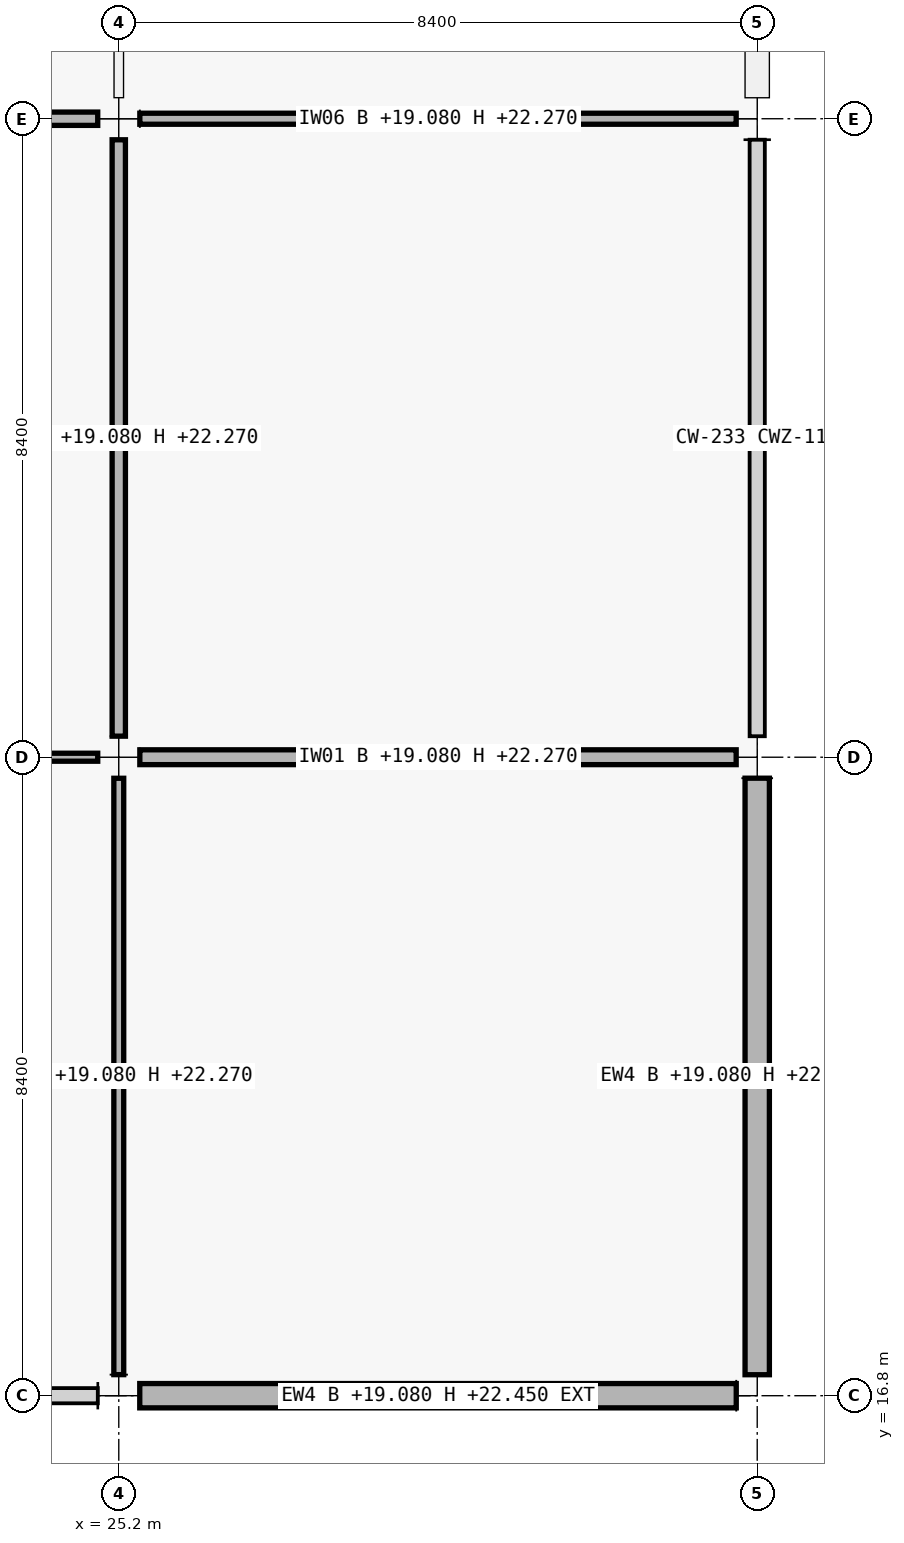
"""IFC4 building model, lengths in metres.
Left out: names, types, materials, properties, quantities, classifications, styles, units other than length and angle.
Written with IfcOpenShell. Run it as: python <this file> out.ifc"""

import sys

from ifc_helpers import new_model, si_unit, direction, frame, frame_2d, origin, origin_2d, place, context, subcontext, project, spatial, rectangle, i_section, extrude, element, fill, save


model = new_model("IFC4")
c1 = context("Model", 3, precision=1e-05, world=origin(), true_north=direction((0.0, 1.0)))
c2 = subcontext(c1, "Body", "Model", "MODEL_VIEW")
j1 = project(units=[si_unit("LENGTHUNIT", "METRE"), si_unit("PLANEANGLEUNIT", "RADIAN")], contexts=[c1])
p1 = place(None, origin())
s1 = spatial("IfcSite", under=j1, at=p1, CompositionType="ELEMENT")
p2 = place(p1, origin())
s2 = spatial("IfcBuilding", under=s1, at=p2, CompositionType="ELEMENT")
p3 = place(p2, frame((0.0, 0.0, 19.08)))
s3 = spatial("IfcBuildingStorey", under=s2, at=p3, CompositionType="ELEMENT", Elevation=19.08)
for number, where, z_axis, x_axis in (
    (1, (25.2, 16.8, 0.0), (0.0, 0.0, 1.0), (1.0, 0.0, 0.0)),
    (2, (25.2, 25.2, 0.0), (0.0, 0.0, 1.0), (1.0, 0.0, 0.0)),
    (3, (25.2, 33.6, 0.0), (0.0, 0.0, 1.0), (1.0, 0.0, 0.0)),
    (4, (33.6, 16.8, 0.0), (0.0, 0.0, 1.0), (1.0, 0.0, 0.0)),
    (5, (33.6, 25.2, 0.0), (0.0, 0.0, 1.0), (1.0, 0.0, 0.0)),
    (6, (33.6, 33.6, 0.0), (0.0, 0.0, 1.0), (1.0, 0.0, 0.0)),
):
    element("IfcColumn", number, at=place(p3, frame(where, z_axis=z_axis, x_axis=x_axis)), inside=s3, PredefinedType="COLUMN", context=c2, shape_type="SweptSolid", body=[
        extrude(rectangle(XDim=0.55, YDim=0.55, at=origin_2d()), origin(), (0.0, 0.0, 1.0), 4.16),
    ])
for number, where, z_axis, x_axis in (
    (7, (25.2, 16.8, 4.16), (0.0, 0.0, 1.0), (1.0, 0.0, 0.0)),
    (8, (25.2, 25.2, 4.16), (0.0, 0.0, 1.0), (1.0, 0.0, 0.0)),
    (9, (25.2, 33.6, 4.16), (0.0, 0.0, 1.0), (1.0, 0.0, 0.0)),
):
    element("IfcColumn", number, at=place(p3, frame(where, z_axis=z_axis, x_axis=x_axis)), inside=s3, PredefinedType="COLUMN", context=c2, shape_type="SweptSolid", body=[
        extrude(i_section(OverallWidth=0.305, OverallDepth=0.308, WebThickness=0.01, FlangeThickness=0.015, FilletRadius=0.017, at=origin_2d()), origin(), (0.0, 0.0, 1.0), 1.925),
    ])
p4 = place(p3, frame((33.324, 16.8, 0.0), z_axis=(0.0, 0.0, 1.0), x_axis=(-1.0, 0.0, 0.0)))
e10 = element("IfcWall", 10, at=p4, inside=s3, PredefinedType="SOLIDWALL", context=c2, shape_type="SweptSolid", body=[
    extrude(rectangle(XDim=7.848, YDim=0.32, at=frame_2d((3.924, 0.0))), origin(), (0.0, 0.0, 1.0), 3.37),
])
p5 = place(p3, frame((33.6, 24.924, 0.0), z_axis=(0.0, 0.0, 1.0), x_axis=(0.0, -1.0, 0.0)))
e11 = element("IfcWall", 11, at=p5, inside=s3, PredefinedType="SOLIDWALL", context=c2, shape_type="SweptSolid", body=[
    extrude(rectangle(XDim=7.848, YDim=0.32, at=frame_2d((3.924, 0.0))), origin(), (0.0, 0.0, 1.0), 3.37),
])
p6 = place(p5, frame((3.249, 0.0, 0.9)))
e12 = element("IfcOpeningElement", 12, at=p6, cuts=e11, PredefinedType="OPENING", context=c2, shape_type="SweptSolid", body=[
    extrude(rectangle(XDim=1.35, YDim=1.5, at=frame_2d((0.675, 0.75))), frame((0.0, 0.16, 0.0), z_axis=(0.0, -1.0, 0.0), x_axis=(1.0, 0.0, 0.0)), (0.0, 0.0, 1.0), 0.32),
])
p7 = place(p3, frame((33.6, 41.724, 0.0), z_axis=(0.0, 0.0, 1.0), x_axis=(0.0, -1.0, 0.0)))
e13 = element("IfcWall", 13, at=p7, inside=s3, PredefinedType="SOLIDWALL", context=c2, shape_type="SweptSolid", body=[
    extrude(rectangle(XDim=7.848, YDim=0.32, at=frame_2d((3.924, 0.0))), origin(), (0.0, 0.0, 1.0), 3.37),
])
p8 = place(p7, frame((3.374, 0.0, 0.9)))
e14 = element("IfcOpeningElement", 14, at=p8, cuts=e13, PredefinedType="OPENING", context=c2, shape_type="SweptSolid", body=[
    extrude(rectangle(XDim=1.1, YDim=1.5, at=frame_2d((0.55, 0.75))), frame((0.0, 0.16, 0.0), z_axis=(0.0, -1.0, 0.0), x_axis=(1.0, 0.0, 0.0)), (0.0, 0.0, 1.0), 0.32),
])
p9 = place(p3, frame((17.077, 25.2, 0.0), z_axis=(0.0, 0.0, 1.0), x_axis=(1.0, 0.0, 0.0)))
e15 = element("IfcWall", 15, at=p9, inside=s3, PredefinedType="PARTITIONING", context=c2, shape_type="SweptSolid", body=[
    extrude(rectangle(XDim=7.846, YDim=0.105, at=frame_2d((3.923, 0.0))), origin(), (0.0, 0.0, 1.0), 3.19),
])
p10 = place(p9, frame((3.418, 0.0, 0.0)))
e16 = element("IfcOpeningElement", 16, at=p10, cuts=e15, PredefinedType="OPENING", context=c2, shape_type="SweptSolid", body=[
    extrude(rectangle(XDim=1.01, YDim=2.12, at=frame_2d((0.505, 1.06))), frame((0.0, 0.052, 0.0), z_axis=(0.0, -1.0, 0.0), x_axis=(1.0, 0.0, 0.0)), (0.0, 0.0, 1.0), 0.105),
])
p11 = place(p3, frame((17.077, 33.6, 0.0), z_axis=(0.0, 0.0, 1.0), x_axis=(1.0, 0.0, 0.0)))
e17 = element("IfcWall", 17, at=p11, inside=s3, PredefinedType="PARTITIONING", context=c2, shape_type="SweptSolid", body=[
    extrude(rectangle(XDim=7.846, YDim=0.175, at=frame_2d((3.923, 0.0))), origin(), (0.0, 0.0, 1.0), 3.19),
])
p12 = place(p11, frame((3.438, 0.0, 0.0)))
e18 = element("IfcOpeningElement", 18, at=p12, cuts=e17, PredefinedType="OPENING", context=c2, shape_type="SweptSolid", body=[
    extrude(rectangle(XDim=0.97, YDim=2.12, at=frame_2d((0.485, 1.06))), frame((0.0, 0.087, 0.0), z_axis=(0.0, -1.0, 0.0), x_axis=(1.0, 0.0, 0.0)), (0.0, 0.0, 1.0), 0.175),
])
p13 = place(p3, frame((25.477, 25.2, 0.0), z_axis=(0.0, 0.0, 1.0), x_axis=(1.0, 0.0, 0.0)))
e19 = element("IfcWall", 19, at=p13, inside=s3, PredefinedType="PARTITIONING", context=c2, shape_type="SweptSolid", body=[
    extrude(rectangle(XDim=7.846, YDim=0.195, at=frame_2d((3.923, 0.0))), origin(), (0.0, 0.0, 1.0), 3.19),
])
p14 = place(p13, frame((3.418, 0.0, 0.0)))
e20 = element("IfcOpeningElement", 20, at=p14, cuts=e19, PredefinedType="OPENING", context=c2, shape_type="SweptSolid", body=[
    extrude(rectangle(XDim=1.01, YDim=2.12, at=frame_2d((0.505, 1.06))), frame((0.0, 0.098, 0.0), z_axis=(0.0, -1.0, 0.0), x_axis=(1.0, 0.0, 0.0)), (0.0, 0.0, 1.0), 0.195),
])
p15 = place(p3, frame((25.477, 33.6, 0.0), z_axis=(0.0, 0.0, 1.0), x_axis=(1.0, 0.0, 0.0)))
e21 = element("IfcWall", 21, at=p15, inside=s3, PredefinedType="PARTITIONING", context=c2, shape_type="SweptSolid", body=[
    extrude(rectangle(XDim=7.846, YDim=0.145, at=frame_2d((3.923, 0.0))), origin(), (0.0, 0.0, 1.0), 3.19),
])
p16 = place(p15, frame((3.438, 0.0, 0.0)))
e22 = element("IfcOpeningElement", 22, at=p16, cuts=e21, PredefinedType="OPENING", context=c2, shape_type="SweptSolid", body=[
    extrude(rectangle(XDim=0.97, YDim=2.12, at=frame_2d((0.485, 1.06))), frame((0.0, 0.073, 0.0), z_axis=(0.0, -1.0, 0.0), x_axis=(1.0, 0.0, 0.0)), (0.0, 0.0, 1.0), 0.145),
])
p17 = place(p3, frame((25.2, 17.077, 0.0), z_axis=(0.0, 0.0, 1.0), x_axis=(0.0, 1.0, 0.0)))
e23 = element("IfcWall", 23, at=p17, inside=s3, PredefinedType="MOVABLE", context=c2, shape_type="SweptSolid", body=[
    extrude(rectangle(XDim=7.846, YDim=0.13, at=frame_2d((3.923, 0.0))), origin(), (0.0, 0.0, 1.0), 3.19),
])
p18 = place(p17, frame((3.398, 0.0, 0.0)))
e24 = element("IfcOpeningElement", 24, at=p18, cuts=e23, PredefinedType="OPENING", context=c2, shape_type="SweptSolid", body=[
    extrude(rectangle(XDim=1.05, YDim=2.12, at=frame_2d((0.525, 1.06))), frame((0.0, 0.065, 0.0), z_axis=(0.0, -1.0, 0.0), x_axis=(1.0, 0.0, 0.0)), (0.0, 0.0, 1.0), 0.13),
])
p19 = place(p3, frame((25.2, 25.477, 0.0), z_axis=(0.0, 0.0, 1.0), x_axis=(0.0, 1.0, 0.0)))
e25 = element("IfcWall", 25, at=p19, inside=s3, PredefinedType="PARTITIONING", context=c2, shape_type="SweptSolid", body=[
    extrude(rectangle(XDim=7.846, YDim=0.175, at=frame_2d((3.923, 0.0))), origin(), (0.0, 0.0, 1.0), 3.19),
])
p20 = place(p19, frame((3.413, 0.0, 0.0)))
e26 = element("IfcOpeningElement", 26, at=p20, cuts=e25, PredefinedType="OPENING", context=c2, shape_type="SweptSolid", body=[
    extrude(rectangle(XDim=1.02, YDim=2.2, at=frame_2d((0.51, 1.1))), frame((0.0, 0.087, 0.0), z_axis=(0.0, -1.0, 0.0), x_axis=(1.0, 0.0, 0.0)), (0.0, 0.0, 1.0), 0.175),
])
p21 = place(p3, frame((25.2, 33.877, 0.0), z_axis=(0.0, 0.0, 1.0), x_axis=(0.0, 1.0, 0.0)))
e27 = element("IfcWall", 27, at=p21, inside=s3, PredefinedType="PARTITIONING", context=c2, shape_type="SweptSolid", body=[
    extrude(rectangle(XDim=7.846, YDim=0.125, at=frame_2d((3.923, 0.0))), origin(), (0.0, 0.0, 1.0), 3.19),
])
p22 = place(p21, frame((3.418, 0.0, 0.0)))
e28 = element("IfcOpeningElement", 28, at=p22, cuts=e27, PredefinedType="OPENING", context=c2, shape_type="SweptSolid", body=[
    extrude(rectangle(XDim=1.01, YDim=2.12, at=frame_2d((0.505, 1.06))), frame((0.0, 0.062, 0.0), z_axis=(0.0, -1.0, 0.0), x_axis=(1.0, 0.0, 0.0)), (0.0, 0.0, 1.0), 0.125),
])
p23 = place(p6, origin())
e29 = element("IfcWindow", 29, at=p23, inside=s3, PartitioningType="SINGLE_PANEL", PredefinedType="WINDOW", context=c2, shape_type="SweptSolid", body=[
    extrude(rectangle(XDim=1.35, YDim=1.5, at=frame_2d((0.675, 0.75))), frame((0.0, 0.03, 0.0), z_axis=(0.0, -1.0, 0.0), x_axis=(1.0, 0.0, 0.0)), (0.0, 0.0, 1.0), 0.06),
])
fill(e12, e29)
p24 = place(p20, origin())
e30 = element("IfcDoor", 30, at=p24, inside=s3, OperationType="SINGLE_SWING_LEFT", PredefinedType="DOOR", context=c2, shape_type="SweptSolid", body=[
    extrude(rectangle(XDim=1.02, YDim=2.2, at=frame_2d((0.51, 1.1))), frame((0.0, 0.025, 0.0), z_axis=(0.0, -1.0, 0.0), x_axis=(1.0, 0.0, 0.0)), (0.0, 0.0, 1.0), 0.05),
])
fill(e26, e30)
p25 = place(p14, origin())
e31 = element("IfcDoor", 31, at=p25, inside=s3, OperationType="SINGLE_SWING_RIGHT", PredefinedType="DOOR", context=c2, shape_type="SweptSolid", body=[
    extrude(rectangle(XDim=1.01, YDim=2.12, at=frame_2d((0.505, 1.06))), frame((0.0, 0.025, 0.0), z_axis=(0.0, -1.0, 0.0), x_axis=(1.0, 0.0, 0.0)), (0.0, 0.0, 1.0), 0.05),
])
fill(e20, e31)
p26 = place(p16, origin())
e32 = element("IfcDoor", 32, at=p26, inside=s3, OperationType="SINGLE_SWING_LEFT", PredefinedType="DOOR", context=c2, shape_type="SweptSolid", body=[
    extrude(rectangle(XDim=0.97, YDim=2.12, at=frame_2d((0.485, 1.06))), frame((0.0, 0.025, 0.0), z_axis=(0.0, -1.0, 0.0), x_axis=(1.0, 0.0, 0.0)), (0.0, 0.0, 1.0), 0.05),
])
fill(e22, e32)
p27 = place(p18, origin())
e33 = element("IfcDoor", 33, at=p27, inside=s3, OperationType="SINGLE_SWING_RIGHT", PredefinedType="DOOR", context=c2, shape_type="SweptSolid", body=[
    extrude(rectangle(XDim=1.05, YDim=2.12, at=frame_2d((0.525, 1.06))), frame((0.0, 0.025, 0.0), z_axis=(0.0, -1.0, 0.0), x_axis=(1.0, 0.0, 0.0)), (0.0, 0.0, 1.0), 0.05),
])
fill(e24, e33)
save(model, sys.argv[1])
